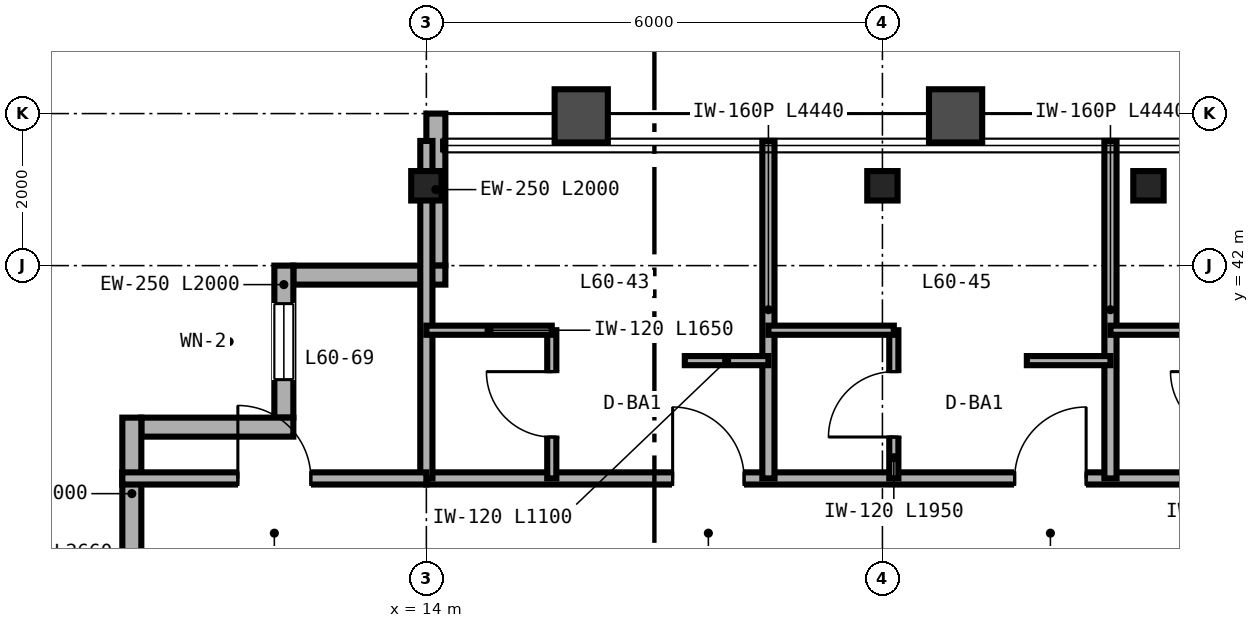
"""IFC4 building model, lengths in metres.
Left out: names, types, materials, properties, quantities, classifications, styles, units other than length and angle.
Written with IfcOpenShell. Run it as: python <this file> out.ifc"""

import sys

from ifc_helpers import new_model, si_unit, direction, frame, frame_2d, origin, origin_2d, place, context, subcontext, project, spatial, rectangle, i_section, extrude, source, transform, mapped, element, fill, save


model = new_model("IFC4")
c1 = context("Model", 3, precision=1e-05, world=origin(), true_north=direction((0.0, 1.0)))
c2 = subcontext(c1, "Body", "Model", "MODEL_VIEW")
j1 = project(units=[si_unit("LENGTHUNIT", "METRE"), si_unit("PLANEANGLEUNIT", "RADIAN")], contexts=[c1])
p1 = place(None, origin())
s1 = spatial("IfcSite", under=j1, at=p1, CompositionType="ELEMENT")
p2 = place(p1, origin())
s2 = spatial("IfcBuilding", under=s1, at=p2, CompositionType="ELEMENT")
p3 = place(p2, frame((0.0, 0.0, 240.0)))
s3 = spatial("IfcBuildingStorey", under=s2, at=p3, CompositionType="ELEMENT", Elevation=240.0)
m1 = source(origin(), c2, "Body", "SweptSolid", [
    extrude(i_section(OverallWidth=0.399, OverallDepth=0.387, WebThickness=0.021, FlangeThickness=0.033, FilletRadius=0.025, at=origin_2d()), origin(), (0.0, 0.0, 1.0), 3.38),
])
for number, where, z_axis, x_axis in (
    (1, (14.0, 43.05, 0.0), (0.0, 0.0, 1.0), (1.0, 0.0, 0.0)),
    (2, (20.0, 43.05, 0.0), (0.0, 0.0, 1.0), (1.0, 0.0, 0.0)),
    (3, (23.5, 43.05, 0.0), (0.0, 0.0, 1.0), (1.0, 0.0, 0.0)),
):
    element("IfcColumn", number, at=place(p3, frame(where, z_axis=z_axis, x_axis=x_axis)), inside=s3, PredefinedType="COLUMN", context=c2, shape_type="MappedRepresentation", body=[
        mapped(m1, transform((0.0, 0.0, 0.0), scale=1.0)),
    ])
p4 = place(p3, frame((14.125, 44.0, 0.0), z_axis=(0.0, 0.0, 1.0), x_axis=(0.0, -1.0, 0.0)))
e4 = element("IfcWall", 4, at=p4, inside=s3, PredefinedType="SOLIDWALL", context=c2, shape_type="SweptSolid", body=[
    extrude(rectangle(XDim=2.0, YDim=0.25, at=frame_2d((1.0, 0.0))), origin(), (0.0, 0.0, 1.0), 2.687),
])
p5 = place(p3, frame((14.25, 41.875, 0.0), z_axis=(0.0, 0.0, 1.0), x_axis=(-1.0, 0.0, 0.0)))
e5 = element("IfcWall", 5, at=p5, inside=s3, PredefinedType="SOLIDWALL", context=c2, shape_type="SweptSolid", body=[
    extrude(rectangle(XDim=2.0, YDim=0.25, at=frame_2d((1.0, 0.0))), origin(), (0.0, 0.0, 1.0), 3.38),
])
p6 = place(p3, frame((12.125, 42.0, 0.0), z_axis=(0.0, 0.0, 1.0), x_axis=(0.0, -1.0, 0.0)))
e6 = element("IfcWall", 6, at=p6, inside=s3, PredefinedType="SOLIDWALL", context=c2, shape_type="SweptSolid", body=[
    extrude(rectangle(XDim=2.0, YDim=0.25, at=frame_2d((1.0, 0.0))), origin(), (0.0, 0.0, 1.0), 3.38),
])
p7 = place(p6, frame((0.5, 0.0, 0.85)))
e7 = element("IfcOpeningElement", 7, at=p7, cuts=e6, PredefinedType="OPENING", context=c2, shape_type="SweptSolid", body=[
    extrude(rectangle(XDim=1.0, YDim=1.9, at=frame_2d((0.5, 0.95))), frame((0.0, 0.135, 0.0), z_axis=(0.0, -1.0, 0.0), x_axis=(1.0, 0.0, 0.0)), (0.0, 0.0, 1.0), 0.27),
])
for number, where, z_axis, x_axis in (
    (8, (12.25, 39.875, 0.0), (0.0, 0.0, 1.0), (-1.0, 0.0, 0.0)),
    (9, (10.125, 40.0, 0.0), (0.0, 0.0, 1.0), (0.0, -1.0, 0.0)),
):
    element("IfcWall", number, at=place(p3, frame(where, z_axis=z_axis, x_axis=x_axis)), inside=s3, PredefinedType="SOLIDWALL", context=c2, shape_type="SweptSolid", body=[
        extrude(rectangle(XDim=2.0, YDim=0.25, at=frame_2d((1.0, 0.0))), origin(), (0.0, 0.0, 1.0), 3.38),
    ])
p8 = place(p3, frame((14.0, 39.2, 0.0), z_axis=(0.0, 0.0, 1.0), x_axis=(1.0, 0.0, 0.0)))
e10 = element("IfcWall", 10, at=p8, inside=s3, PredefinedType="PARTITIONING", context=c2, shape_type="SweptSolid", body=[
    extrude(rectangle(XDim=36.0, YDim=0.16, at=frame_2d((18.0, 0.0))), origin(), (0.0, 0.0, 1.0), 2.923),
])
p9 = place(p8, frame((3.24, 0.0, 0.0)))
e11 = element("IfcOpeningElement", 11, at=p9, cuts=e10, PredefinedType="OPENING", context=c2, shape_type="SweptSolid", body=[
    extrude(rectangle(XDim=0.94, YDim=2.15, at=frame_2d((0.47, 1.075))), frame((0.0, 0.09, 0.0), z_axis=(0.0, -1.0, 0.0), x_axis=(1.0, 0.0, 0.0)), (0.0, 0.0, 1.0), 0.18),
])
p10 = place(p8, frame((7.74, 0.0, 0.0)))
e12 = element("IfcOpeningElement", 12, at=p10, cuts=e10, PredefinedType="OPENING", context=c2, shape_type="SweptSolid", body=[
    extrude(rectangle(XDim=0.94, YDim=2.15, at=frame_2d((0.47, 1.075))), frame((0.0, 0.09, 0.0), z_axis=(0.0, -1.0, 0.0), x_axis=(1.0, 0.0, 0.0)), (0.0, 0.0, 1.0), 0.18),
])
p11 = place(p8, frame((12.24, 0.0, 0.0)))
e13 = element("IfcOpeningElement", 13, at=p11, cuts=e10, PredefinedType="OPENING", context=c2, shape_type="SweptSolid", body=[
    extrude(rectangle(XDim=0.94, YDim=2.15, at=frame_2d((0.47, 1.075))), frame((0.0, 0.09, 0.0), z_axis=(0.0, -1.0, 0.0), x_axis=(1.0, 0.0, 0.0)), (0.0, 0.0, 1.0), 0.18),
])
p12 = place(p8, frame((16.74, 0.0, 0.0)))
e14 = element("IfcOpeningElement", 14, at=p12, cuts=e10, PredefinedType="OPENING", context=c2, shape_type="SweptSolid", body=[
    extrude(rectangle(XDim=0.94, YDim=2.15, at=frame_2d((0.47, 1.075))), frame((0.0, 0.09, 0.0), z_axis=(0.0, -1.0, 0.0), x_axis=(1.0, 0.0, 0.0)), (0.0, 0.0, 1.0), 0.18),
])
p13 = place(p8, frame((21.24, 0.0, 0.0)))
e15 = element("IfcOpeningElement", 15, at=p13, cuts=e10, PredefinedType="OPENING", context=c2, shape_type="SweptSolid", body=[
    extrude(rectangle(XDim=0.94, YDim=2.15, at=frame_2d((0.47, 1.075))), frame((0.0, 0.09, 0.0), z_axis=(0.0, -1.0, 0.0), x_axis=(1.0, 0.0, 0.0)), (0.0, 0.0, 1.0), 0.18),
])
p14 = place(p8, frame((25.74, 0.0, 0.0)))
e16 = element("IfcOpeningElement", 16, at=p14, cuts=e10, PredefinedType="OPENING", context=c2, shape_type="SweptSolid", body=[
    extrude(rectangle(XDim=0.94, YDim=2.15, at=frame_2d((0.47, 1.075))), frame((0.0, 0.09, 0.0), z_axis=(0.0, -1.0, 0.0), x_axis=(1.0, 0.0, 0.0)), (0.0, 0.0, 1.0), 0.18),
])
p15 = place(p8, frame((30.24, 0.0, 0.0)))
e17 = element("IfcOpeningElement", 17, at=p15, cuts=e10, PredefinedType="OPENING", context=c2, shape_type="SweptSolid", body=[
    extrude(rectangle(XDim=0.94, YDim=2.15, at=frame_2d((0.47, 1.075))), frame((0.0, 0.09, 0.0), z_axis=(0.0, -1.0, 0.0), x_axis=(1.0, 0.0, 0.0)), (0.0, 0.0, 1.0), 0.18),
])
p16 = place(p8, frame((34.74, 0.0, 0.0)))
e18 = element("IfcOpeningElement", 18, at=p16, cuts=e10, PredefinedType="OPENING", context=c2, shape_type="SweptSolid", body=[
    extrude(rectangle(XDim=0.94, YDim=2.15, at=frame_2d((0.47, 1.075))), frame((0.0, 0.09, 0.0), z_axis=(0.0, -1.0, 0.0), x_axis=(1.0, 0.0, 0.0)), (0.0, 0.0, 1.0), 0.18),
])
for number, where, z_axis, x_axis in (
    (19, (14.0, 39.2, 0.0), (0.0, 0.0, 1.0), (0.0, 1.0, 0.0)),
    (20, (18.5, 39.2, 0.0), (0.0, 0.0, 1.0), (0.0, 1.0, 0.0)),
):
    element("IfcWall", number, at=place(p3, frame(where, z_axis=z_axis, x_axis=x_axis)), inside=s3, PredefinedType="PARTITIONING", context=c2, shape_type="SweptSolid", body=[
        extrude(rectangle(XDim=4.44, YDim=0.16, at=frame_2d((2.22, 0.0))), origin(), (0.0, 0.0, 1.0), 2.687),
    ])
p17 = place(p3, frame((15.65, 39.2, 0.0), z_axis=(0.0, 0.0, 1.0), x_axis=(0.0, 1.0, 0.0)))
e21 = element("IfcWall", 21, at=p17, inside=s3, PredefinedType="PARTITIONING", context=c2, shape_type="SweptSolid", body=[
    extrude(rectangle(XDim=1.95, YDim=0.12, at=frame_2d((0.975, 0.0))), origin(), (0.0, 0.0, 1.0), 3.38),
])
p18 = place(p17, frame((0.545, 0.0, 0.0)))
e22 = element("IfcOpeningElement", 22, at=p18, cuts=e21, PredefinedType="OPENING", context=c2, shape_type="SweptSolid", body=[
    extrude(rectangle(XDim=0.86, YDim=2.1, at=frame_2d((0.43, 1.05))), frame((0.0, 0.07, 0.0), z_axis=(0.0, -1.0, 0.0), x_axis=(1.0, 0.0, 0.0)), (0.0, 0.0, 1.0), 0.14),
])
p19 = place(p3, frame((14.0, 41.15, 0.0), z_axis=(0.0, 0.0, 1.0), x_axis=(1.0, 0.0, 0.0)))
e23 = element("IfcWall", 23, at=p19, inside=s3, PredefinedType="PARTITIONING", context=c2, shape_type="SweptSolid", body=[
    extrude(rectangle(XDim=1.65, YDim=0.12, at=frame_2d((0.825, 0.0))), origin(), (0.0, 0.0, 1.0), 3.38),
])
p20 = place(p3, frame((17.4, 40.75, 0.0), z_axis=(0.0, 0.0, 1.0), x_axis=(1.0, 0.0, 0.0)))
e24 = element("IfcWall", 24, at=p20, inside=s3, PredefinedType="PARTITIONING", context=c2, shape_type="SweptSolid", body=[
    extrude(rectangle(XDim=1.1, YDim=0.12, at=frame_2d((0.55, 0.0))), origin(), (0.0, 0.0, 1.0), 3.38),
])
p21 = place(p3, frame((23.0, 39.2, 0.0), z_axis=(0.0, 0.0, 1.0), x_axis=(0.0, 1.0, 0.0)))
e25 = element("IfcWall", 25, at=p21, inside=s3, PredefinedType="PARTITIONING", context=c2, shape_type="SweptSolid", body=[
    extrude(rectangle(XDim=4.44, YDim=0.16, at=frame_2d((2.22, 0.0))), origin(), (0.0, 0.0, 1.0), 2.843),
])
p22 = place(p3, frame((20.15, 39.2, 0.0), z_axis=(0.0, 0.0, 1.0), x_axis=(0.0, 1.0, 0.0)))
e26 = element("IfcWall", 26, at=p22, inside=s3, PredefinedType="PARTITIONING", context=c2, shape_type="SweptSolid", body=[
    extrude(rectangle(XDim=1.95, YDim=0.12, at=frame_2d((0.975, 0.0))), origin(), (0.0, 0.0, 1.0), 3.38),
])
p23 = place(p22, frame((0.545, 0.0, 0.0)))
e27 = element("IfcOpeningElement", 27, at=p23, cuts=e26, PredefinedType="OPENING", context=c2, shape_type="SweptSolid", body=[
    extrude(rectangle(XDim=0.86, YDim=2.1, at=frame_2d((0.43, 1.05))), frame((0.0, 0.07, 0.0), z_axis=(0.0, -1.0, 0.0), x_axis=(1.0, 0.0, 0.0)), (0.0, 0.0, 1.0), 0.14),
])
p24 = place(p3, frame((18.5, 41.15, 0.0), z_axis=(0.0, 0.0, 1.0), x_axis=(1.0, 0.0, 0.0)))
e28 = element("IfcWall", 28, at=p24, inside=s3, PredefinedType="PARTITIONING", context=c2, shape_type="SweptSolid", body=[
    extrude(rectangle(XDim=1.65, YDim=0.12, at=frame_2d((0.825, 0.0))), origin(), (0.0, 0.0, 1.0), 3.38),
])
p25 = place(p3, frame((21.9, 40.75, 0.0), z_axis=(0.0, 0.0, 1.0), x_axis=(1.0, 0.0, 0.0)))
e29 = element("IfcWall", 29, at=p25, inside=s3, PredefinedType="PARTITIONING", context=c2, shape_type="SweptSolid", body=[
    extrude(rectangle(XDim=1.1, YDim=0.12, at=frame_2d((0.55, 0.0))), origin(), (0.0, 0.0, 1.0), 3.38),
])
p26 = place(p3, frame((23.0, 41.15, 0.0), z_axis=(0.0, 0.0, 1.0), x_axis=(1.0, 0.0, 0.0)))
e30 = element("IfcWall", 30, at=p26, inside=s3, PredefinedType="PARTITIONING", context=c2, shape_type="SweptSolid", body=[
    extrude(rectangle(XDim=1.65, YDim=0.12, at=frame_2d((0.825, 0.0))), origin(), (0.0, 0.0, 1.0), 2.923),
])
p27 = place(p3, frame((10.0, 39.2, 0.0), z_axis=(0.0, 0.0, 1.0), x_axis=(1.0, 0.0, 0.0)))
e31 = element("IfcWall", 31, at=p27, inside=s3, PredefinedType="PARTITIONING", context=c2, shape_type="SweptSolid", body=[
    extrude(rectangle(XDim=4.0, YDim=0.16, at=frame_2d((2.0, 0.0))), origin(), (0.0, 0.0, 1.0), 3.38),
])
p28 = place(p27, frame((1.52, 0.0, 0.0)))
e32 = element("IfcOpeningElement", 32, at=p28, cuts=e31, PredefinedType="OPENING", context=c2, shape_type="SweptSolid", body=[
    extrude(rectangle(XDim=0.96, YDim=2.15, at=frame_2d((0.48, 1.075))), frame((0.0, 0.09, 0.0), z_axis=(0.0, -1.0, 0.0), x_axis=(1.0, 0.0, 0.0)), (0.0, 0.0, 1.0), 0.18),
])
m2 = source(origin(), c2, "Body", "SweptSolid", [
    extrude(rectangle(XDim=1.0, YDim=1.9, at=frame_2d((0.5, 0.95))), frame((0.0, 0.03, 0.0), z_axis=(0.0, -1.0, 0.0), x_axis=(1.0, 0.0, 0.0)), (0.0, 0.0, 1.0), 0.06),
])
p29 = place(p7, origin())
e33 = element("IfcWindow", 33, at=p29, inside=s3, PartitioningType="SINGLE_PANEL", PredefinedType="WINDOW", context=c2, shape_type="MappedRepresentation", body=[
    mapped(m2, transform((0.0, 0.0, 0.0), scale=1.0)),
])
fill(e7, e33)
m3 = source(origin(), c2, "Body", "SweptSolid", [
    extrude(rectangle(XDim=0.86, YDim=2.1, at=frame_2d((0.43, 1.05))), frame((0.0, 0.025, 0.0), z_axis=(0.0, -1.0, 0.0), x_axis=(1.0, 0.0, 0.0)), (0.0, 0.0, 1.0), 0.05),
])
p30 = place(p18, origin())
e34 = element("IfcDoor", 34, at=p30, inside=s3, OperationType="SINGLE_SWING_RIGHT", PredefinedType="DOOR", context=c2, shape_type="MappedRepresentation", body=[
    mapped(m3, transform((0.0, 0.0, 0.0), scale=1.0)),
])
fill(e22, e34)
p31 = place(p23, origin())
e35 = element("IfcDoor", 35, at=p31, inside=s3, OperationType="SINGLE_SWING_LEFT", PredefinedType="DOOR", context=c2, shape_type="MappedRepresentation", body=[
    mapped(m3, transform((0.0, 0.0, 0.0), scale=1.0)),
])
fill(e27, e35)
m4 = source(origin(), c2, "Body", "SweptSolid", [
    extrude(rectangle(XDim=0.94, YDim=2.15, at=frame_2d((0.47, 1.075))), frame((0.0, 0.025, 0.0), z_axis=(0.0, -1.0, 0.0), x_axis=(1.0, 0.0, 0.0)), (0.0, 0.0, 1.0), 0.05),
])
p32 = place(p9, origin())
e36 = element("IfcDoor", 36, at=p32, inside=s3, OperationType="SINGLE_SWING_LEFT", PredefinedType="DOOR", context=c2, shape_type="MappedRepresentation", body=[
    mapped(m4, transform((0.0, 0.0, 0.0), scale=1.0)),
])
fill(e11, e36)
p33 = place(p10, origin())
e37 = element("IfcDoor", 37, at=p33, inside=s3, OperationType="SINGLE_SWING_RIGHT", PredefinedType="DOOR", context=c2, shape_type="MappedRepresentation", body=[
    mapped(m4, transform((0.0, 0.0, 0.0), scale=1.0)),
])
fill(e12, e37)
m5 = source(origin(), c2, "Body", "SweptSolid", [
    extrude(rectangle(XDim=0.96, YDim=2.15, at=frame_2d((0.48, 1.075))), frame((0.0, 0.025, 0.0), z_axis=(0.0, -1.0, 0.0), x_axis=(1.0, 0.0, 0.0)), (0.0, 0.0, 1.0), 0.05),
])
p34 = place(p28, origin())
e38 = element("IfcDoor", 38, at=p34, inside=s3, OperationType="SINGLE_SWING_LEFT", PredefinedType="DOOR", context=c2, shape_type="MappedRepresentation", body=[
    mapped(m5, transform((0.0, 0.0, 0.0), scale=1.0)),
])
fill(e32, e38)
save(model, sys.argv[1])
